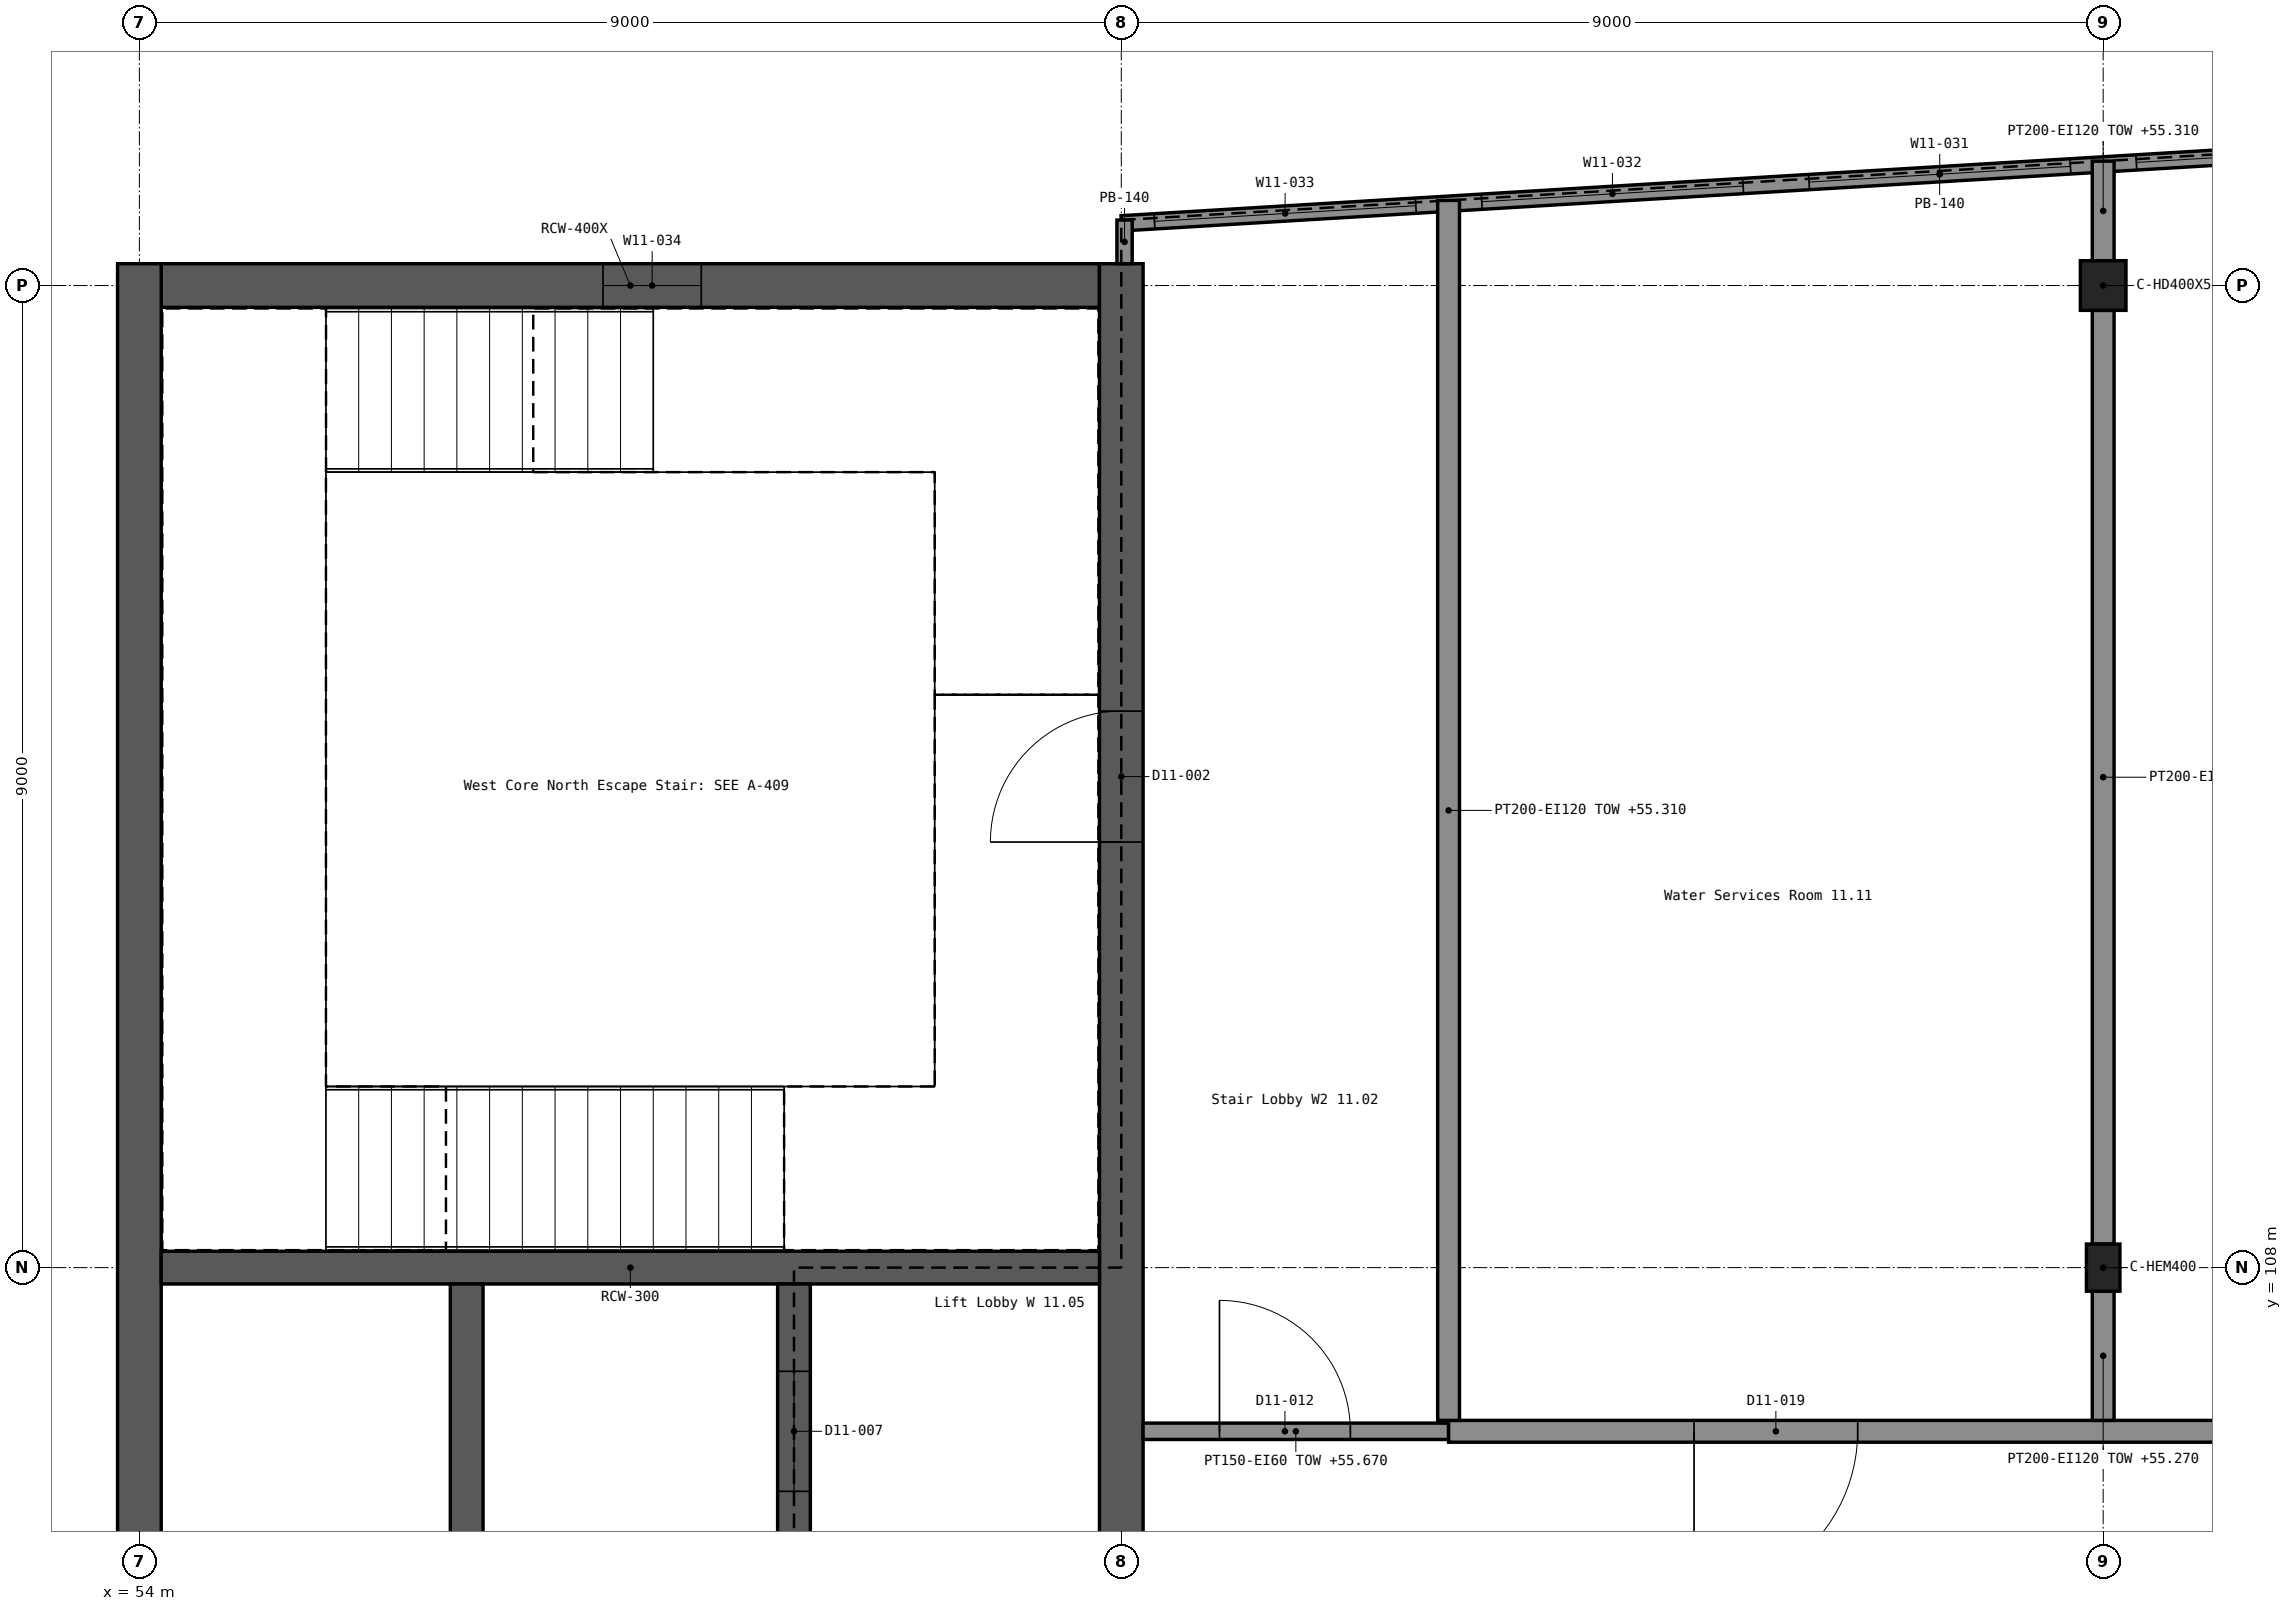
"""IFC4 building model, lengths in metres.
Left out: names, types, materials, properties, quantities, classifications, styles, units other than length and angle.
Written with IfcOpenShell. Run it as: python <this file> out.ifc"""

import sys

from ifc_helpers import new_model, si_unit, direction, frame, frame_2d, origin, origin_2d, place, context, subcontext, project, spatial, rectangle, i_section, extrude, element, fill, save


model = new_model("IFC4")
c1 = context("Model", 3, precision=1e-05, world=origin(), true_north=direction((0.0, 1.0)))
c2 = subcontext(c1, "Body", "Model", "MODEL_VIEW")
j1 = project(units=[si_unit("LENGTHUNIT", "METRE"), si_unit("PLANEANGLEUNIT", "RADIAN")], contexts=[c1])
p1 = place(None, origin())
s1 = spatial("IfcSite", under=j1, at=p1, CompositionType="ELEMENT")
p2 = place(p1, origin())
s2 = spatial("IfcBuilding", under=s1, at=p2, CompositionType="ELEMENT")
p3 = place(p2, frame((0.0, 0.0, 51.9)))
s3 = spatial("IfcBuildingStorey", under=s2, at=p3, CompositionType="ELEMENT", Elevation=51.9)
p4 = place(p3, frame((54.2, 117.0, 0.0), z_axis=(0.0, 0.0, 1.0), x_axis=(1.0, 0.0, 0.0)))
e1 = element("IfcWall", 1, at=p4, inside=s3, PredefinedType="SHEAR", context=c2, shape_type="SweptSolid", body=[
    extrude(rectangle(XDim=8.6, YDim=0.4, at=frame_2d((4.3, 0.0))), origin(), (0.0, 0.0, 1.0), 3.9),
])
p5 = place(p4, frame((4.05, 0.0, 1.2)))
e2 = element("IfcOpeningElement", 2, at=p5, cuts=e1, PredefinedType="OPENING", context=c2, shape_type="SweptSolid", body=[
    extrude(rectangle(XDim=0.9, YDim=1.5, at=frame_2d((0.45, 0.75))), frame((0.0, 0.211, 0.0), z_axis=(0.0, -1.0, 0.0), x_axis=(1.0, 0.0, 0.0)), (0.0, 0.0, 1.0), 0.422),
])
p6 = place(p3, frame((54.0, 89.8, 0.0), z_axis=(0.0, 0.0, 1.0), x_axis=(0.0, 1.0, 0.0)))
e3 = element("IfcWall", 3, at=p6, inside=s3, PredefinedType="SHEAR", context=c2, shape_type="SweptSolid", body=[
    extrude(rectangle(XDim=27.4, YDim=0.4, at=frame_2d((13.7, 0.0))), origin(), (0.0, 0.0, 1.0), 3.9),
])
p7 = place(p3, frame((63.0, 89.8, 0.0), z_axis=(0.0, 0.0, 1.0), x_axis=(0.0, 1.0, 0.0)))
e4 = element("IfcWall", 4, at=p7, inside=s3, PredefinedType="SHEAR", context=c2, shape_type="SweptSolid", body=[
    extrude(rectangle(XDim=27.4, YDim=0.4, at=frame_2d((13.7, 0.0))), origin(), (0.0, 0.0, 1.0), 3.9),
])
p8 = place(p7, frame((4.1, 0.0, 0.0)))
e5 = element("IfcOpeningElement", 5, at=p8, cuts=e4, PredefinedType="OPENING", context=c2, shape_type="SweptSolid", body=[
    extrude(rectangle(XDim=1.2, YDim=2.1, at=frame_2d((0.6, 1.05))), frame((0.0, 0.211, 0.0), z_axis=(0.0, -1.0, 0.0), x_axis=(1.0, 0.0, 0.0)), (0.0, 0.0, 1.0), 0.422),
])
p9 = place(p7, frame((22.1, 0.0, 0.0)))
e6 = element("IfcOpeningElement", 6, at=p9, cuts=e4, PredefinedType="OPENING", context=c2, shape_type="SweptSolid", body=[
    extrude(rectangle(XDim=1.2, YDim=2.1, at=frame_2d((0.6, 1.05))), frame((0.0, 0.211, 0.0), z_axis=(0.0, -1.0, 0.0), x_axis=(1.0, 0.0, 0.0)), (0.0, 0.0, 1.0), 0.422),
])
p10 = place(p7, frame((12.5, 0.0, 0.0)))
e7 = element("IfcOpeningElement", 7, at=p10, cuts=e4, PredefinedType="OPENING", context=c2, shape_type="SweptSolid", body=[
    extrude(rectangle(XDim=2.0, YDim=2.1, at=frame_2d((1.0, 1.05))), frame((0.0, 0.211, 0.0), z_axis=(0.0, -1.0, 0.0), x_axis=(1.0, 0.0, 0.0)), (0.0, 0.0, 1.0), 0.422),
])
p11 = place(p3, frame((54.2, 108.0, 0.0), z_axis=(0.0, 0.0, 1.0), x_axis=(1.0, 0.0, 0.0)))
e8 = element("IfcWall", 8, at=p11, inside=s3, PredefinedType="SHEAR", context=c2, shape_type="SweptSolid", body=[
    extrude(rectangle(XDim=8.6, YDim=0.3, at=frame_2d((4.3, 0.0))), origin(), (0.0, 0.0, 1.0), 3.9),
])
p12 = place(p3, frame((57.0, 99.15, 0.0), z_axis=(0.0, 0.0, 1.0), x_axis=(0.0, 1.0, 0.0)))
e9 = element("IfcWall", 9, at=p12, inside=s3, PredefinedType="SHEAR", context=c2, shape_type="SweptSolid", body=[
    extrude(rectangle(XDim=8.7, YDim=0.3, at=frame_2d((4.35, 0.0))), origin(), (0.0, 0.0, 1.0), 3.9),
])
p13 = place(p3, frame((60.0, 99.15, 0.0), z_axis=(0.0, 0.0, 1.0), x_axis=(0.0, 1.0, 0.0)))
e10 = element("IfcWall", 10, at=p13, inside=s3, PredefinedType="SHEAR", context=c2, shape_type="SweptSolid", body=[
    extrude(rectangle(XDim=8.7, YDim=0.3, at=frame_2d((4.35, 0.0))), origin(), (0.0, 0.0, 1.0), 3.9),
])
p14 = place(p13, frame((0.8, 0.0, 0.0)))
e11 = element("IfcOpeningElement", 11, at=p14, cuts=e10, PredefinedType="OPENING", context=c2, shape_type="SweptSolid", body=[
    extrude(rectangle(XDim=1.1, YDim=2.1, at=frame_2d((0.55, 1.05))), frame((0.0, 0.161, 0.0), z_axis=(0.0, -1.0, 0.0), x_axis=(1.0, 0.0, 0.0)), (0.0, 0.0, 1.0), 0.322),
])
p15 = place(p13, frame((3.8, 0.0, 0.0)))
e12 = element("IfcOpeningElement", 12, at=p15, cuts=e10, PredefinedType="OPENING", context=c2, shape_type="SweptSolid", body=[
    extrude(rectangle(XDim=1.1, YDim=2.1, at=frame_2d((0.55, 1.05))), frame((0.0, 0.161, 0.0), z_axis=(0.0, -1.0, 0.0), x_axis=(1.0, 0.0, 0.0)), (0.0, 0.0, 1.0), 0.322),
])
p16 = place(p13, frame((6.8, 0.0, 0.0)))
e13 = element("IfcOpeningElement", 13, at=p16, cuts=e10, PredefinedType="OPENING", context=c2, shape_type="SweptSolid", body=[
    extrude(rectangle(XDim=1.1, YDim=2.1, at=frame_2d((0.55, 1.05))), frame((0.0, 0.161, 0.0), z_axis=(0.0, -1.0, 0.0), x_axis=(1.0, 0.0, 0.0)), (0.0, 0.0, 1.0), 0.322),
])
p17 = place(p3, frame((72.0, 108.0, 0.0), z_axis=(0.0, 0.0, 1.0), x_axis=(1.0, 0.0, 0.0)))
e14 = element("IfcColumn", 14, at=p17, inside=s3, PredefinedType="COLUMN", context=c2, shape_type="SweptSolid", body=[
    extrude(i_section(OverallWidth=0.307, OverallDepth=0.432, WebThickness=0.021, FlangeThickness=0.04, FilletRadius=0.027, at=origin_2d()), origin(), (0.0, 0.0, 1.0), 3.9),
])
p18 = place(p3, frame((72.0, 117.0, 0.0), z_axis=(0.0, 0.0, 1.0), x_axis=(1.0, 0.0, 0.0)))
e15 = element("IfcColumn", 15, at=p18, inside=s3, PredefinedType="COLUMN", context=c2, shape_type="SweptSolid", body=[
    extrude(i_section(OverallWidth=0.418, OverallDepth=0.455, WebThickness=0.042, FlangeThickness=0.068, FilletRadius=0.015, at=origin_2d()), origin(), (0.0, 0.0, 1.0), 3.9),
])
p19 = place(p3, frame((78.0, 118.47, 0.0), z_axis=(0.0, 0.0, 1.0), x_axis=(-0.998204826037, -0.059892614536, 0.0)))
e16 = element("IfcWall", 16, at=p19, inside=s3, PredefinedType="SOLIDWALL", context=c2, shape_type="SweptSolid", body=[
    extrude(rectangle(XDim=15.025, YDim=0.14, at=frame_2d((7.513, 0.0))), origin(), (0.0, 0.0, 1.0), 3.9),
])
p20 = place(p19, frame((0.301, 0.0, 0.6)))
e17 = element("IfcOpeningElement", 17, at=p20, cuts=e16, PredefinedType="OPENING", context=c2, shape_type="SweptSolid", body=[
    extrude(rectangle(XDim=2.4, YDim=2.4, at=frame_2d((1.2, 1.2))), frame((0.0, 0.081, 0.0), z_axis=(0.0, -1.0, 0.0), x_axis=(1.0, 0.0, 0.0)), (0.0, 0.0, 1.0), 0.162),
])
p21 = place(p19, frame((3.306, 0.0, 0.6)))
e18 = element("IfcOpeningElement", 18, at=p21, cuts=e16, PredefinedType="OPENING", context=c2, shape_type="SweptSolid", body=[
    extrude(rectangle(XDim=2.4, YDim=2.4, at=frame_2d((1.2, 1.2))), frame((0.0, 0.081, 0.0), z_axis=(0.0, -1.0, 0.0), x_axis=(1.0, 0.0, 0.0)), (0.0, 0.0, 1.0), 0.162),
])
p22 = place(p19, frame((6.312, 0.0, 0.6)))
e19 = element("IfcOpeningElement", 19, at=p22, cuts=e16, PredefinedType="OPENING", context=c2, shape_type="SweptSolid", body=[
    extrude(rectangle(XDim=2.4, YDim=2.4, at=frame_2d((1.2, 1.2))), frame((0.0, 0.081, 0.0), z_axis=(0.0, -1.0, 0.0), x_axis=(1.0, 0.0, 0.0)), (0.0, 0.0, 1.0), 0.162),
])
p23 = place(p19, frame((9.317, 0.0, 0.6)))
e20 = element("IfcOpeningElement", 20, at=p23, cuts=e16, PredefinedType="OPENING", context=c2, shape_type="SweptSolid", body=[
    extrude(rectangle(XDim=2.4, YDim=2.4, at=frame_2d((1.2, 1.2))), frame((0.0, 0.081, 0.0), z_axis=(0.0, -1.0, 0.0), x_axis=(1.0, 0.0, 0.0)), (0.0, 0.0, 1.0), 0.162),
])
p24 = place(p19, frame((12.323, 0.0, 0.6)))
e21 = element("IfcOpeningElement", 21, at=p24, cuts=e16, PredefinedType="OPENING", context=c2, shape_type="SweptSolid", body=[
    extrude(rectangle(XDim=2.4, YDim=2.4, at=frame_2d((1.2, 1.2))), frame((0.0, 0.081, 0.0), z_axis=(0.0, -1.0, 0.0), x_axis=(1.0, 0.0, 0.0)), (0.0, 0.0, 1.0), 0.162),
])
p25 = place(p3, frame((63.03, 117.6, 0.0), z_axis=(0.0, 0.0, 1.0), x_axis=(0.0, -1.0, 0.0)))
e22 = element("IfcWall", 22, at=p25, inside=s3, PredefinedType="SOLIDWALL", context=c2, shape_type="SweptSolid", body=[
    extrude(rectangle(XDim=0.4, YDim=0.14, at=frame_2d((0.2, 0.0))), origin(), (0.0, 0.0, 1.0), 3.9),
])
p26 = place(p3, frame((63.2, 106.5, 0.0), z_axis=(0.0, 0.0, 1.0), x_axis=(1.0, 0.0, 0.0)))
e23 = element("IfcWall", 23, at=p26, inside=s3, PredefinedType="PARTITIONING", context=c2, shape_type="SweptSolid", body=[
    extrude(rectangle(XDim=2.8, YDim=0.15, at=frame_2d((1.4, 0.0))), origin(), (0.0, 0.0, 1.0), 3.77),
])
p27 = place(p26, frame((0.7, 0.0, 0.0)))
e24 = element("IfcOpeningElement", 24, at=p27, cuts=e23, PredefinedType="OPENING", context=c2, shape_type="SweptSolid", body=[
    extrude(rectangle(XDim=1.2, YDim=2.1, at=frame_2d((0.6, 1.05))), frame((0.0, 0.086, 0.0), z_axis=(0.0, -1.0, 0.0), x_axis=(1.0, 0.0, 0.0)), (0.0, 0.0, 1.0), 0.172),
])
p28 = place(p3, frame((66.0, 106.5, 0.0), z_axis=(0.0, 0.0, 1.0), x_axis=(1.0, 0.0, 0.0)))
e25 = element("IfcWall", 25, at=p28, inside=s3, PredefinedType="PARTITIONING", context=c2, shape_type="SweptSolid", body=[
    extrude(rectangle(XDim=39.0, YDim=0.2, at=frame_2d((19.5, 0.0))), origin(), (0.0, 0.0, 1.0), 3.77),
])
p29 = place(p28, frame((2.25, 0.0, 0.0)))
e26 = element("IfcOpeningElement", 26, at=p29, cuts=e25, PredefinedType="OPENING", context=c2, shape_type="SweptSolid", body=[
    extrude(rectangle(XDim=1.5, YDim=2.4, at=frame_2d((0.75, 1.2))), frame((0.0, 0.111, 0.0), z_axis=(0.0, -1.0, 0.0), x_axis=(1.0, 0.0, 0.0)), (0.0, 0.0, 1.0), 0.222),
])
p30 = place(p28, frame((9.75, 0.0, 0.0)))
e27 = element("IfcOpeningElement", 27, at=p30, cuts=e25, PredefinedType="OPENING", context=c2, shape_type="SweptSolid", body=[
    extrude(rectangle(XDim=1.5, YDim=2.4, at=frame_2d((0.75, 1.2))), frame((0.0, 0.111, 0.0), z_axis=(0.0, -1.0, 0.0), x_axis=(1.0, 0.0, 0.0)), (0.0, 0.0, 1.0), 0.222),
])
p31 = place(p28, frame((24.375, 0.0, 0.0)))
e28 = element("IfcOpeningElement", 28, at=p31, cuts=e25, PredefinedType="OPENING", context=c2, shape_type="SweptSolid", body=[
    extrude(rectangle(XDim=1.5, YDim=2.4, at=frame_2d((0.75, 1.2))), frame((0.0, 0.111, 0.0), z_axis=(0.0, -1.0, 0.0), x_axis=(1.0, 0.0, 0.0)), (0.0, 0.0, 1.0), 0.222),
])
p32 = place(p28, frame((35.25, 0.0, 0.0)))
e29 = element("IfcOpeningElement", 29, at=p32, cuts=e25, PredefinedType="OPENING", context=c2, shape_type="SweptSolid", body=[
    extrude(rectangle(XDim=1.5, YDim=2.4, at=frame_2d((0.75, 1.2))), frame((0.0, 0.111, 0.0), z_axis=(0.0, -1.0, 0.0), x_axis=(1.0, 0.0, 0.0)), (0.0, 0.0, 1.0), 0.222),
])
p33 = place(p3, frame((66.0, 106.6, 0.0), z_axis=(0.0, 0.0, 1.0), x_axis=(0.0, 1.0, 0.0)))
e30 = element("IfcWall", 30, at=p33, inside=s3, PredefinedType="PARTITIONING", context=c2, shape_type="SweptSolid", body=[
    extrude(rectangle(XDim=11.18, YDim=0.2, at=frame_2d((5.59, 0.0))), origin(), (0.0, 0.0, 1.0), 3.41),
])
p34 = place(p3, frame((72.0, 106.6, 0.0), z_axis=(0.0, 0.0, 1.0), x_axis=(0.0, 1.0, 0.0)))
e31 = element("IfcWall", 31, at=p34, inside=s3, PredefinedType="PARTITIONING", context=c2, shape_type="SweptSolid", body=[
    extrude(rectangle(XDim=1.184, YDim=0.2, at=frame_2d((0.592, 0.0))), origin(), (0.0, 0.0, 1.0), 3.37),
])
p35 = place(p3, frame((72.0, 108.216, 0.0), z_axis=(0.0, 0.0, 1.0), x_axis=(0.0, 1.0, 0.0)))
e32 = element("IfcWall", 32, at=p35, inside=s3, PredefinedType="PARTITIONING", context=c2, shape_type="SweptSolid", body=[
    extrude(rectangle(XDim=8.556, YDim=0.2, at=frame_2d((4.278, 0.0))), origin(), (0.0, 0.0, 1.0), 3.37),
])
p36 = place(p3, frame((72.0, 117.228, 0.0), z_axis=(0.0, 0.0, 1.0), x_axis=(0.0, 1.0, 0.0)))
e33 = element("IfcWall", 33, at=p36, inside=s3, PredefinedType="PARTITIONING", context=c2, shape_type="SweptSolid", body=[
    extrude(rectangle(XDim=0.912, YDim=0.2, at=frame_2d((0.456, 0.0))), origin(), (0.0, 0.0, 1.0), 3.41),
])
p37 = place(p21, origin())
e34 = element("IfcWindow", 34, at=p37, inside=s3, PartitioningType="SINGLE_PANEL", PredefinedType="WINDOW", context=c2, shape_type="SweptSolid", body=[
    extrude(rectangle(XDim=2.4, YDim=2.4, at=frame_2d((1.2, 1.2))), frame((0.0, 0.03, 0.0), z_axis=(0.0, -1.0, 0.0), x_axis=(1.0, 0.0, 0.0)), (0.0, 0.0, 1.0), 0.06),
])
fill(e18, e34)
p38 = place(p22, origin())
e35 = element("IfcWindow", 35, at=p38, inside=s3, PartitioningType="SINGLE_PANEL", PredefinedType="WINDOW", context=c2, shape_type="SweptSolid", body=[
    extrude(rectangle(XDim=2.4, YDim=2.4, at=frame_2d((1.2, 1.2))), frame((0.0, 0.03, 0.0), z_axis=(0.0, -1.0, 0.0), x_axis=(1.0, 0.0, 0.0)), (0.0, 0.0, 1.0), 0.06),
])
fill(e19, e35)
p39 = place(p23, origin())
e36 = element("IfcWindow", 36, at=p39, inside=s3, PartitioningType="SINGLE_PANEL", PredefinedType="WINDOW", context=c2, shape_type="SweptSolid", body=[
    extrude(rectangle(XDim=2.4, YDim=2.4, at=frame_2d((1.2, 1.2))), frame((0.0, 0.03, 0.0), z_axis=(0.0, -1.0, 0.0), x_axis=(1.0, 0.0, 0.0)), (0.0, 0.0, 1.0), 0.06),
])
fill(e20, e36)
p40 = place(p24, origin())
e37 = element("IfcWindow", 37, at=p40, inside=s3, PartitioningType="SINGLE_PANEL", PredefinedType="WINDOW", context=c2, shape_type="SweptSolid", body=[
    extrude(rectangle(XDim=2.4, YDim=2.4, at=frame_2d((1.2, 1.2))), frame((0.0, 0.03, 0.0), z_axis=(0.0, -1.0, 0.0), x_axis=(1.0, 0.0, 0.0)), (0.0, 0.0, 1.0), 0.06),
])
fill(e21, e37)
p41 = place(p5, origin())
e38 = element("IfcWindow", 38, at=p41, inside=s3, PartitioningType="SINGLE_PANEL", PredefinedType="WINDOW", context=c2, shape_type="SweptSolid", body=[
    extrude(rectangle(XDim=0.9, YDim=1.5, at=frame_2d((0.45, 0.75))), frame((0.0, 0.03, 0.0), z_axis=(0.0, -1.0, 0.0), x_axis=(1.0, 0.0, 0.0)), (0.0, 0.0, 1.0), 0.06),
])
fill(e2, e38)
p42 = place(p9, origin())
e39 = element("IfcDoor", 39, at=p42, inside=s3, OperationType="SINGLE_SWING_LEFT", PredefinedType="DOOR", context=c2, shape_type="SweptSolid", body=[
    extrude(rectangle(XDim=1.2, YDim=2.1, at=frame_2d((0.6, 1.05))), frame((0.0, 0.025, 0.0), z_axis=(0.0, -1.0, 0.0), x_axis=(1.0, 0.0, 0.0)), (0.0, 0.0, 1.0), 0.05),
])
fill(e6, e39)
p43 = place(p16, origin())
e40 = element("IfcDoor", 40, at=p43, inside=s3, OperationType="DOUBLE_DOOR_SLIDING", PredefinedType="DOOR", context=c2, shape_type="SweptSolid", body=[
    extrude(rectangle(XDim=1.1, YDim=2.1, at=frame_2d((0.55, 1.05))), frame((0.0, 0.025, 0.0), z_axis=(0.0, -1.0, 0.0), x_axis=(1.0, 0.0, 0.0)), (0.0, 0.0, 1.0), 0.05),
])
fill(e13, e40)
p44 = place(p27, origin())
e41 = element("IfcDoor", 41, at=p44, inside=s3, OperationType="SINGLE_SWING_LEFT", PredefinedType="DOOR", context=c2, shape_type="SweptSolid", body=[
    extrude(rectangle(XDim=1.2, YDim=2.1, at=frame_2d((0.6, 1.05))), frame((0.0, 0.025, 0.0), z_axis=(0.0, -1.0, 0.0), x_axis=(1.0, 0.0, 0.0)), (0.0, 0.0, 1.0), 0.05),
])
fill(e24, e41)
p45 = place(p29, frame((1.5, 0.0, 0.0), z_axis=(0.0, 0.0, 1.0), x_axis=(-1.0, 0.0, 0.0)))
e42 = element("IfcDoor", 42, at=p45, inside=s3, OperationType="DOUBLE_DOOR_SINGLE_SWING", PredefinedType="DOOR", context=c2, shape_type="SweptSolid", body=[
    extrude(rectangle(XDim=1.5, YDim=2.4, at=frame_2d((0.75, 1.2))), frame((0.0, 0.025, 0.0), z_axis=(0.0, -1.0, 0.0), x_axis=(1.0, 0.0, 0.0)), (0.0, 0.0, 1.0), 0.05),
])
fill(e26, e42)
save(model, sys.argv[1])
